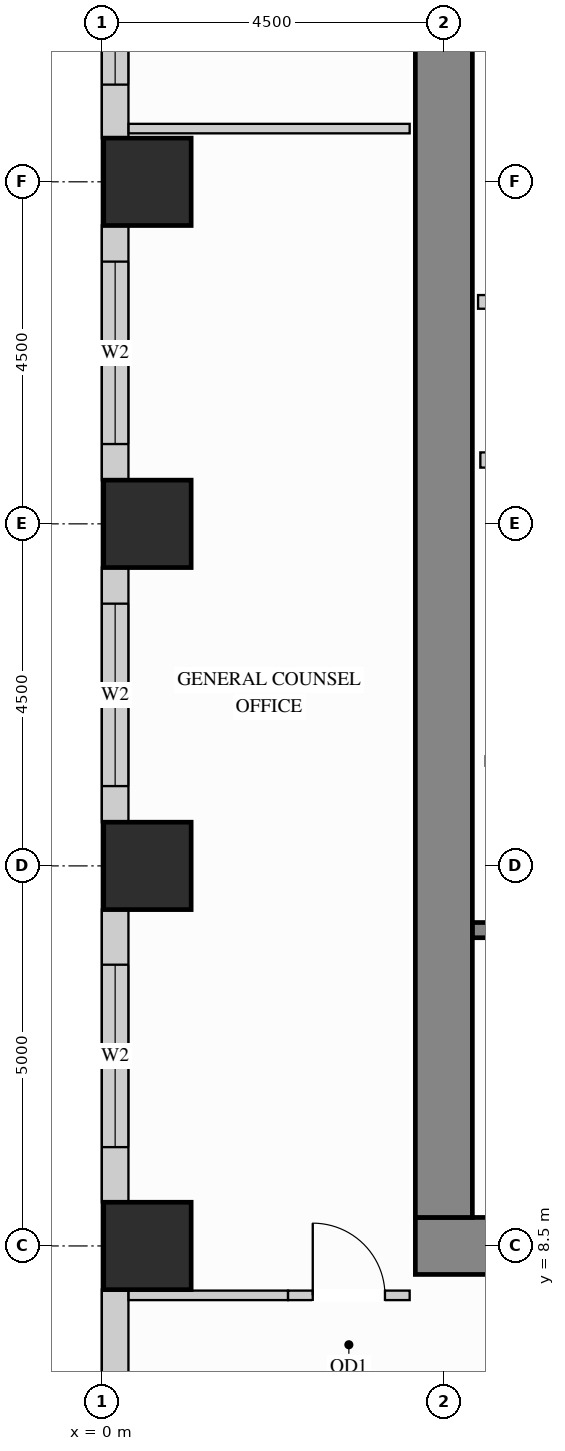
"""IFC4 building model, lengths in metres.
Left out: names, types, materials, properties, quantities, classifications, styles, units other than length and angle.
Written with IfcOpenShell. Run it as: python <this file> out.ifc"""

import sys

from ifc_helpers import new_model, si_unit, direction, frame, frame_2d, origin, origin_2d, place, context, subcontext, project, spatial, rectangle, extrude, source, transform, mapped, element, fill, save


model = new_model("IFC4")
c1 = context("Model", 3, precision=1e-05, world=origin(), true_north=direction((0.0, 1.0)))
c2 = subcontext(c1, "Body", "Model", "MODEL_VIEW")
j1 = project(units=[si_unit("LENGTHUNIT", "METRE"), si_unit("PLANEANGLEUNIT", "RADIAN")], contexts=[c1])
p1 = place(None, origin())
s1 = spatial("IfcSite", under=j1, at=p1, CompositionType="ELEMENT")
p2 = place(p1, origin())
s2 = spatial("IfcBuilding", under=s1, at=p2, CompositionType="ELEMENT")
p3 = place(p2, frame((0.0, 0.0, 113.4)))
s3 = spatial("IfcBuildingStorey", under=s2, at=p3, CompositionType="ELEMENT", Elevation=113.4)
m1 = source(origin(), c2, "Body", "SweptSolid", [
    extrude(rectangle(XDim=1.15, YDim=1.15, at=origin_2d()), origin(), (0.0, 0.0, 1.0), 3.38),
])
for number, where, z_axis, x_axis in (
    (1, (0.6, 13.5, 0.0), (0.0, 0.0, 1.0), (1.0, 0.0, 0.0)),
    (2, (0.6, 18.0, 0.0), (0.0, 0.0, 1.0), (1.0, 0.0, 0.0)),
    (3, (0.6, 22.5, 0.0), (0.0, 0.0, 1.0), (1.0, 0.0, 0.0)),
    (4, (0.6, 8.5, 0.0), (0.0, 0.0, 1.0), (1.0, 0.0, 0.0)),
):
    element("IfcColumn", number, at=place(p3, frame(where, z_axis=z_axis, x_axis=x_axis)), inside=s3, PredefinedType="COLUMN", context=c2, shape_type="MappedRepresentation", body=[
        mapped(m1, transform((0.0, 0.0, 0.0), x_axis=(1.0, 0.0, 0.0), y_axis=(0.0, 1.0, 0.0), z_axis=(0.0, 0.0, 1.0))),
    ])
m2 = source(origin(), c2, "Body", "SweptSolid", [
    extrude(rectangle(XDim=10.75, YDim=0.75, at=frame_2d((5.375, 0.0))), origin(), (0.0, 0.0, 1.0), 3.38),
])
p4 = place(p3, frame((4.125, 8.5, 0.0), z_axis=(0.0, 0.0, 1.0), x_axis=(1.0, 0.0, 0.0)))
e5 = element("IfcWall", 5, at=p4, inside=s3, PredefinedType="SHEAR", context=c2, shape_type="MappedRepresentation", body=[
    mapped(m2, transform((0.0, 0.0, 0.0), x_axis=(1.0, 0.0, 0.0), y_axis=(0.0, 1.0, 0.0), z_axis=(0.0, 0.0, 1.0))),
])
m3 = source(origin(), c2, "Body", "SweptSolid", [
    extrude(rectangle(XDim=20.25, YDim=0.75, at=frame_2d((10.125, 0.0))), origin(), (0.0, 0.0, 1.0), 3.38),
])
p5 = place(p3, frame((4.5, 8.875, 0.0), z_axis=(0.0, 0.0, 1.0), x_axis=(0.0, 1.0, 0.0)))
e6 = element("IfcWall", 6, at=p5, inside=s3, PredefinedType="SHEAR", context=c2, shape_type="MappedRepresentation", body=[
    mapped(m3, transform((0.0, 0.0, 0.0), x_axis=(1.0, 0.0, 0.0), y_axis=(0.0, 1.0, 0.0), z_axis=(0.0, 0.0, 1.0))),
])
p6 = place(p3, frame((0.175, 26.227, 0.0), z_axis=(0.0, 0.0, 1.0), x_axis=(0.0, -1.0, 0.0)))
e7 = element("IfcWall", 7, at=p6, inside=s3, PredefinedType="SOLIDWALL", context=c2, shape_type="SweptSolid", body=[
    extrude(rectangle(XDim=3.154, YDim=0.35, at=frame_2d((1.577, 0.0))), origin(), (0.0, 0.0, 1.0), 3.365),
])
p7 = place(p6, frame((0.648, 0.0, 0.78)))
e8 = element("IfcOpeningElement", 8, at=p7, cuts=e7, PredefinedType="OPENING", context=c2, shape_type="SweptSolid", body=[
    extrude(rectangle(XDim=1.8, YDim=2.1, at=frame_2d((0.9, 1.05))), frame((0.0, 0.185, 0.0), z_axis=(0.0, -1.0, 0.0), x_axis=(1.0, 0.0, 0.0)), (0.0, 0.0, 1.0), 0.37),
])
p8 = place(p3, frame((0.175, 21.927, 0.0), z_axis=(0.0, 0.0, 1.0), x_axis=(0.0, -1.0, 0.0)))
e9 = element("IfcWall", 9, at=p8, inside=s3, PredefinedType="SOLIDWALL", context=c2, shape_type="SweptSolid", body=[
    extrude(rectangle(XDim=3.354, YDim=0.35, at=frame_2d((1.677, 0.0))), origin(), (0.0, 0.0, 1.0), 3.365),
])
p9 = place(p8, frame((0.477, 0.0, 0.78)))
e10 = element("IfcOpeningElement", 10, at=p9, cuts=e9, PredefinedType="OPENING", context=c2, shape_type="SweptSolid", body=[
    extrude(rectangle(XDim=2.4, YDim=2.1, at=frame_2d((1.2, 1.05))), frame((0.0, 0.185, 0.0), z_axis=(0.0, -1.0, 0.0), x_axis=(1.0, 0.0, 0.0)), (0.0, 0.0, 1.0), 0.37),
])
p10 = place(p3, frame((0.175, 17.427, 0.0), z_axis=(0.0, 0.0, 1.0), x_axis=(0.0, -1.0, 0.0)))
e11 = element("IfcWall", 11, at=p10, inside=s3, PredefinedType="SOLIDWALL", context=c2, shape_type="SweptSolid", body=[
    extrude(rectangle(XDim=3.354, YDim=0.35, at=frame_2d((1.677, 0.0))), origin(), (0.0, 0.0, 1.0), 3.365),
])
p11 = place(p10, frame((0.477, 0.0, 0.78)))
e12 = element("IfcOpeningElement", 12, at=p11, cuts=e11, PredefinedType="OPENING", context=c2, shape_type="SweptSolid", body=[
    extrude(rectangle(XDim=2.4, YDim=2.1, at=frame_2d((1.2, 1.05))), frame((0.0, 0.185, 0.0), z_axis=(0.0, -1.0, 0.0), x_axis=(1.0, 0.0, 0.0)), (0.0, 0.0, 1.0), 0.37),
])
p12 = place(p3, frame((0.175, 12.927, 0.0), z_axis=(0.0, 0.0, 1.0), x_axis=(0.0, -1.0, 0.0)))
e13 = element("IfcWall", 13, at=p12, inside=s3, PredefinedType="SOLIDWALL", context=c2, shape_type="SweptSolid", body=[
    extrude(rectangle(XDim=3.854, YDim=0.35, at=frame_2d((1.927, 0.0))), origin(), (0.0, 0.0, 1.0), 3.365),
])
p13 = place(p12, frame((0.727, 0.0, 0.78)))
e14 = element("IfcOpeningElement", 14, at=p13, cuts=e13, PredefinedType="OPENING", context=c2, shape_type="SweptSolid", body=[
    extrude(rectangle(XDim=2.4, YDim=2.1, at=frame_2d((1.2, 1.05))), frame((0.0, 0.185, 0.0), z_axis=(0.0, -1.0, 0.0), x_axis=(1.0, 0.0, 0.0)), (0.0, 0.0, 1.0), 0.37),
])
p14 = place(p3, frame((0.175, 7.927, 0.0), z_axis=(0.0, 0.0, 1.0), x_axis=(0.0, -1.0, 0.0)))
e15 = element("IfcWall", 15, at=p14, inside=s3, PredefinedType="SOLIDWALL", context=c2, shape_type="SweptSolid", body=[
    extrude(rectangle(XDim=3.854, YDim=0.35, at=frame_2d((1.927, 0.0))), origin(), (0.0, 0.0, 1.0), 3.365),
])
p15 = place(p14, frame((2.206, 0.0, 0.78)))
e16 = element("IfcOpeningElement", 16, at=p15, cuts=e15, PredefinedType="OPENING", context=c2, shape_type="SweptSolid", body=[
    extrude(rectangle(XDim=1.2, YDim=2.1, at=frame_2d((0.6, 1.05))), frame((0.0, 0.185, 0.0), z_axis=(0.0, -1.0, 0.0), x_axis=(1.0, 0.0, 0.0)), (0.0, 0.0, 1.0), 0.37),
])
m4 = source(origin(), c2, "Body", "SweptSolid", [
    extrude(rectangle(XDim=2.2, YDim=0.18, at=frame_2d((1.1, 0.0))), origin(), (0.0, 0.0, 1.0), 3.365),
])
p16 = place(p3, frame((4.95, 20.92, 0.0), z_axis=(0.0, 0.0, 1.0), x_axis=(1.0, 0.0, 0.0)))
e17 = element("IfcWall", 17, at=p16, inside=s3, PredefinedType="PARTITIONING", context=c2, shape_type="MappedRepresentation", body=[
    mapped(m4, transform((0.0, 0.0, 0.0), x_axis=(1.0, 0.0, 0.0), y_axis=(0.0, 1.0, 0.0), z_axis=(0.0, 0.0, 1.0))),
])
p17 = place(p3, frame((5.05, 14.88, 0.0), z_axis=(0.0, 0.0, 1.0), x_axis=(1.0, 0.0, 0.0)))
e18 = element("IfcWall", 18, at=p17, inside=s3, PredefinedType="PARTITIONING", context=c2, shape_type="SweptSolid", body=[
    extrude(rectangle(XDim=2.35, YDim=0.125, at=frame_2d((1.175, 0.0))), origin(), (0.0, 0.0, 1.0), 3.365),
])
p18 = place(p17, frame((0.7, 0.0, 0.0)))
e19 = element("IfcOpeningElement", 19, at=p18, cuts=e18, PredefinedType="OPENING", context=c2, shape_type="SweptSolid", body=[
    extrude(rectangle(XDim=0.85, YDim=2.1, at=frame_2d((0.425, 1.05))), frame((0.0, 0.073, 0.0), z_axis=(0.0, -1.0, 0.0), x_axis=(1.0, 0.0, 0.0)), (0.0, 0.0, 1.0), 0.145),
])
m5 = source(origin(), c2, "Body", "SweptSolid", [
    extrude(rectangle(XDim=2.098, YDim=0.125, at=frame_2d((1.049, 0.0))), origin(), (0.0, 0.0, 1.0), 3.365),
])
p19 = place(p3, frame((0.352, 7.85, 0.0), z_axis=(0.0, 0.0, 1.0), x_axis=(1.0, 0.0, 0.0)))
e20 = element("IfcWall", 20, at=p19, inside=s3, PredefinedType="PARTITIONING", context=c2, shape_type="MappedRepresentation", body=[
    mapped(m5, transform((0.0, 0.0, 0.0), x_axis=(1.0, 0.0, 0.0), y_axis=(0.0, 1.0, 0.0), z_axis=(0.0, 0.0, 1.0))),
])
p20 = place(p3, frame((2.45, 7.85, 0.0), z_axis=(0.0, 0.0, 1.0), x_axis=(1.0, 0.0, 0.0)))
e21 = element("IfcWall", 21, at=p20, inside=s3, PredefinedType="PARTITIONING", context=c2, shape_type="SweptSolid", body=[
    extrude(rectangle(XDim=1.6, YDim=0.125, at=frame_2d((0.8, 0.0))), origin(), (0.0, 0.0, 1.0), 3.365),
])
p21 = place(p20, frame((0.325, 0.0, 0.0)))
e22 = element("IfcOpeningElement", 22, at=p21, cuts=e21, PredefinedType="OPENING", context=c2, shape_type="SweptSolid", body=[
    extrude(rectangle(XDim=0.95, YDim=2.15, at=frame_2d((0.475, 1.075))), frame((0.0, 0.073, 0.0), z_axis=(0.0, -1.0, 0.0), x_axis=(1.0, 0.0, 0.0)), (0.0, 0.0, 1.0), 0.145),
])
m6 = source(origin(), c2, "Body", "SweptSolid", [
    extrude(rectangle(XDim=3.698, YDim=0.125, at=frame_2d((1.849, 0.0))), origin(), (0.0, 0.0, 1.0), 3.365),
])
p22 = place(p3, frame((0.352, 23.2, 0.0), z_axis=(0.0, 0.0, 1.0), x_axis=(1.0, 0.0, 0.0)))
e23 = element("IfcWall", 23, at=p22, inside=s3, PredefinedType="PARTITIONING", context=c2, shape_type="MappedRepresentation", body=[
    mapped(m6, transform((0.0, 0.0, 0.0), x_axis=(1.0, 0.0, 0.0), y_axis=(0.0, 1.0, 0.0), z_axis=(0.0, 0.0, 1.0))),
])
m7 = source(origin(), c2, "Body", "SweptSolid", [
    extrude(rectangle(XDim=2.09, YDim=0.2, at=frame_2d((1.045, 0.0))), origin(), (0.0, 0.0, 1.0), 3.365),
])
p23 = place(p3, frame((4.98, 18.84, 0.0), z_axis=(0.0, 0.0, 1.0), x_axis=(1.0, 0.0, 0.0)))
e24 = element("IfcWall", 24, at=p23, inside=s3, PredefinedType="PARTITIONING", context=c2, shape_type="MappedRepresentation", body=[
    mapped(m7, transform((0.0, 0.0, 0.0), x_axis=(1.0, 0.0, 0.0), y_axis=(0.0, 1.0, 0.0), z_axis=(0.0, 0.0, 1.0))),
])
p24 = place(p3, frame((4.877, 12.655, 0.0), z_axis=(0.0, 0.0, 1.0), x_axis=(1.0, 0.0, 0.0)))
e25 = element("IfcWall", 25, at=p24, inside=s3, PredefinedType="SHEAR", context=c2, shape_type="SweptSolid", body=[
    extrude(rectangle(XDim=7.528, YDim=0.2, at=frame_2d((3.764, 0.0))), origin(), (0.0, 0.0, 1.0), 3.38),
])
p25 = place(p24, frame((0.4, 0.0, 0.0)))
e26 = element("IfcOpeningElement", 26, at=p25, cuts=e25, PredefinedType="OPENING", context=c2, shape_type="SweptSolid", body=[
    extrude(rectangle(XDim=1.1, YDim=2.15, at=frame_2d((0.55, 1.075))), frame((0.0, 0.11, 0.0), z_axis=(0.0, -1.0, 0.0), x_axis=(1.0, 0.0, 0.0)), (0.0, 0.0, 1.0), 0.22),
])
m8 = source(origin(), c2, "Body", "SweptSolid", [
    extrude(rectangle(XDim=0.95, YDim=2.15, at=frame_2d((0.475, 1.075))), frame((0.0, 0.025, 0.0), z_axis=(0.0, -1.0, 0.0), x_axis=(1.0, 0.0, 0.0)), (0.0, 0.0, 1.0), 0.05),
])
p26 = place(p21, origin())
e27 = element("IfcDoor", 27, at=p26, inside=s3, OperationType="SINGLE_SWING_LEFT", PredefinedType="DOOR", context=c2, shape_type="MappedRepresentation", body=[
    mapped(m8, transform((0.0, 0.0, 0.0), x_axis=(1.0, 0.0, 0.0), y_axis=(0.0, 1.0, 0.0), z_axis=(0.0, 0.0, 1.0))),
])
fill(e22, e27)
m9 = source(origin(), c2, "Body", "SweptSolid", [
    extrude(rectangle(XDim=1.8, YDim=2.1, at=frame_2d((0.9, 1.05))), frame((0.0, 0.03, 0.0), z_axis=(0.0, -1.0, 0.0), x_axis=(1.0, 0.0, 0.0)), (0.0, 0.0, 1.0), 0.06),
])
p27 = place(p7, origin())
e28 = element("IfcWindow", 28, at=p27, inside=s3, PartitioningType="SINGLE_PANEL", PredefinedType="WINDOW", context=c2, shape_type="MappedRepresentation", body=[
    mapped(m9, transform((0.0, 0.0, 0.0), x_axis=(1.0, 0.0, 0.0), y_axis=(0.0, 1.0, 0.0), z_axis=(0.0, 0.0, 1.0))),
])
fill(e8, e28)
m10 = source(origin(), c2, "Body", "SweptSolid", [
    extrude(rectangle(XDim=2.4, YDim=2.1, at=frame_2d((1.2, 1.05))), frame((0.0, 0.03, 0.0), z_axis=(0.0, -1.0, 0.0), x_axis=(1.0, 0.0, 0.0)), (0.0, 0.0, 1.0), 0.06),
])
p28 = place(p9, origin())
e29 = element("IfcWindow", 29, at=p28, inside=s3, PartitioningType="SINGLE_PANEL", PredefinedType="WINDOW", context=c2, shape_type="MappedRepresentation", body=[
    mapped(m10, transform((0.0, 0.0, 0.0), x_axis=(1.0, 0.0, 0.0), y_axis=(0.0, 1.0, 0.0), z_axis=(0.0, 0.0, 1.0))),
])
fill(e10, e29)
p29 = place(p11, origin())
e30 = element("IfcWindow", 30, at=p29, inside=s3, PartitioningType="SINGLE_PANEL", PredefinedType="WINDOW", context=c2, shape_type="MappedRepresentation", body=[
    mapped(m10, transform((0.0, 0.0, 0.0), x_axis=(1.0, 0.0, 0.0), y_axis=(0.0, 1.0, 0.0), z_axis=(0.0, 0.0, 1.0))),
])
fill(e12, e30)
p30 = place(p13, origin())
e31 = element("IfcWindow", 31, at=p30, inside=s3, PartitioningType="SINGLE_PANEL", PredefinedType="WINDOW", context=c2, shape_type="MappedRepresentation", body=[
    mapped(m10, transform((0.0, 0.0, 0.0), x_axis=(1.0, 0.0, 0.0), y_axis=(0.0, 1.0, 0.0), z_axis=(0.0, 0.0, 1.0))),
])
fill(e14, e31)
save(model, sys.argv[1])
